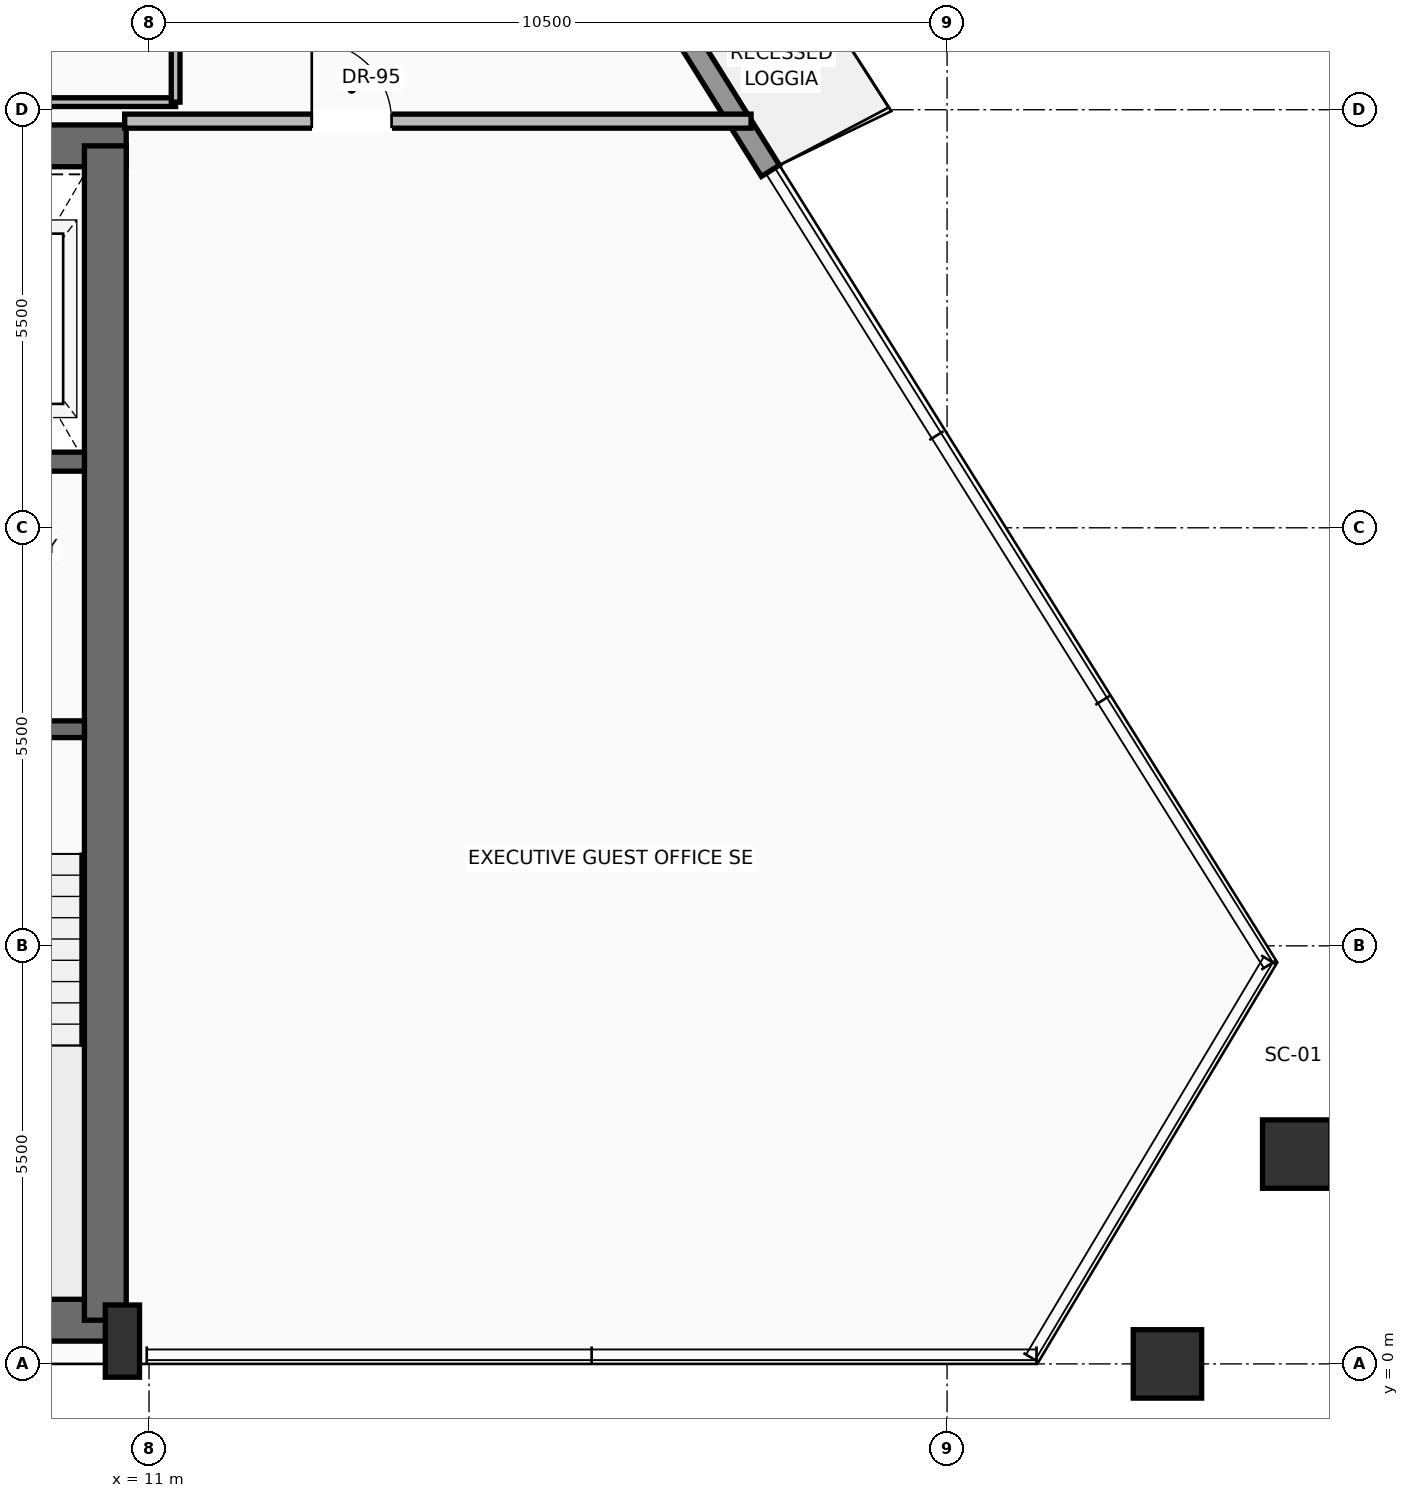
"""IFC4 building model, lengths in metres.
Left out: names, types, materials, properties, quantities, classifications, styles, units other than length and angle.
Written with IfcOpenShell. Run it as: python <this file> out.ifc"""

import sys

from ifc_helpers import new_model, si_unit, direction, frame, frame_2d, origin, origin_2d, place, context, subcontext, project, spatial, rectangle, hollow_rectangle, extrude, source, transform, mapped, element, fill, save


model = new_model("IFC4")
c1 = context("Model", 3, precision=1e-05, world=origin(), true_north=direction((0.0, 1.0)))
c2 = subcontext(c1, "Body", "Model", "MODEL_VIEW")
j1 = project(units=[si_unit("LENGTHUNIT", "METRE"), si_unit("PLANEANGLEUNIT", "RADIAN")], contexts=[c1])
p1 = place(None, origin())
s1 = spatial("IfcSite", under=j1, at=p1, CompositionType="ELEMENT")
p2 = place(p1, origin())
s2 = spatial("IfcBuilding", under=s1, at=p2, CompositionType="ELEMENT")
p3 = place(p2, frame((0.0, 0.0, 223.45)))
s3 = spatial("IfcBuildingStorey", under=s2, at=p3, CompositionType="ELEMENT", Elevation=223.45)
p4 = place(p3, frame((-10.65, 0.575, 0.0), z_axis=(0.0, 0.0, 1.0), x_axis=(1.0, 0.0, 0.0)))
e1 = element("IfcWall", 1, at=p4, inside=s3, PredefinedType="SHEAR", context=c2, shape_type="SweptSolid", body=[
    extrude(rectangle(XDim=21.3, YDim=0.55, at=frame_2d((10.65, 0.0))), origin(), (0.0, 0.0, 1.0), 3.24),
])
p5 = place(p3, frame((-10.7, 16.025, 0.0), z_axis=(0.0, 0.0, 1.0), x_axis=(1.0, 0.0, 0.0)))
e2 = element("IfcWall", 2, at=p5, inside=s3, PredefinedType="SHEAR", context=c2, shape_type="SweptSolid", body=[
    extrude(rectangle(XDim=21.4, YDim=0.55, at=frame_2d((10.7, 0.0))), origin(), (0.0, 0.0, 1.0), 3.24),
])
p6 = place(p5, frame((3.27, 0.0, 0.0)))
e3 = element("IfcOpeningElement", 3, at=p6, cuts=e2, PredefinedType="OPENING", context=c2, shape_type="SweptSolid", body=[
    extrude(rectangle(XDim=1.3, YDim=2.3, at=frame_2d((0.65, 1.15))), frame((0.0, 0.285, 0.0), z_axis=(0.0, -1.0, 0.0), x_axis=(1.0, 0.0, 0.0)), (0.0, 0.0, 1.0), 0.57),
])
p7 = place(p5, frame((9.7, 0.0, 0.0)))
e4 = element("IfcOpeningElement", 4, at=p7, cuts=e2, PredefinedType="OPENING", context=c2, shape_type="SweptSolid", body=[
    extrude(rectangle(XDim=2.0, YDim=2.4, at=frame_2d((1.0, 1.2))), frame((0.0, 0.285, 0.0), z_axis=(0.0, -1.0, 0.0), x_axis=(1.0, 0.0, 0.0)), (0.0, 0.0, 1.0), 0.57),
])
p8 = place(p3, frame((10.425, 0.575, 0.0), z_axis=(0.0, 0.0, 1.0), x_axis=(0.0, 1.0, 0.0)))
e5 = element("IfcWall", 5, at=p8, inside=s3, PredefinedType="SHEAR", context=c2, shape_type="SweptSolid", body=[
    extrude(rectangle(XDim=15.45, YDim=0.55, at=frame_2d((7.725, 0.0))), origin(), (0.0, 0.0, 1.0), 3.24),
])
m1 = source(origin(), c2, "Body", "SweptSolid", [
    extrude(rectangle(XDim=0.45, YDim=0.95, at=origin_2d()), origin(), (0.0, 0.0, 1.0), 3.45),
])
p9 = place(p3, frame((10.65, 0.3, 0.0), z_axis=(0.0, 0.0, 1.0), x_axis=(1.0, 0.0, 0.0)))
e6 = element("IfcColumn", 6, at=p9, inside=s3, PredefinedType="PILASTER", context=c2, shape_type="MappedRepresentation", body=[
    mapped(m1, transform((0.0, 0.0, 0.0), scale=1.0)),
])
m2 = source(origin(), c2, "Body", "SweptSolid", [
    extrude(hollow_rectangle(XDim=0.9, YDim=0.9, WallThickness=0.045, at=origin_2d()), origin(), (0.0, 0.0, 1.0), 3.441),
])
p10 = place(p3, frame((24.399, 0.0, 0.004), z_axis=(0.002766928039, 0.0, 0.999996172047), x_axis=(0.0, 1.0, 0.0)))
e7 = element("IfcColumn", 7, at=p10, inside=s3, PredefinedType="COLUMN", context=c2, shape_type="MappedRepresentation", body=[
    mapped(m2, transform((0.0, 0.0, 0.0), scale=1.0)),
])
m3 = source(origin(), c2, "Body", "SweptSolid", [
    extrude(hollow_rectangle(XDim=0.9, YDim=0.9, WallThickness=0.045, at=origin_2d()), origin(), (0.0, 0.0, 1.0), 3.442),
])
p11 = place(p3, frame((26.1, 2.76, 0.004), z_axis=(-0.008937740985, -0.016669596282, 0.999821104671), x_axis=(0.881312658049, -0.47253359538, 0.0)))
e8 = element("IfcColumn", 8, at=p11, inside=s3, PredefinedType="COLUMN", context=c2, shape_type="MappedRepresentation", body=[
    mapped(m3, transform((0.0, 0.0, 0.0), scale=1.0)),
])
p12 = place(p3, frame((8.883, 32.178, 0.0), z_axis=(0.0, 0.0, 1.0), x_axis=(0.529719957473, -0.848172604282, 0.0)))
e9 = element("IfcWall", 9, at=p12, inside=s3, PredefinedType="SOLIDWALL", context=c2, shape_type="SweptSolid", body=[
    extrude(rectangle(XDim=19.431, YDim=0.28, at=frame_2d((9.716, 0.0))), origin(), (0.0, 0.0, 1.0), 2.82),
])
p13 = place(p12, frame((4.664, 0.0, 0.0)))
e10 = element("IfcOpeningElement", 10, at=p13, cuts=e9, PredefinedType="OPENING", context=c2, shape_type="SweptSolid", body=[
    extrude(rectangle(XDim=1.6, YDim=2.35, at=frame_2d((0.8, 1.175))), frame((0.0, 0.15, 0.0), z_axis=(0.0, -1.0, 0.0), x_axis=(1.0, 0.0, 0.0)), (0.0, 0.0, 1.0), 0.3),
])
p14 = place(p12, frame((13.213, 0.0, 0.9)))
e11 = element("IfcOpeningElement", 11, at=p14, cuts=e9, PredefinedType="OPENING", context=c2, shape_type="SweptSolid", body=[
    extrude(rectangle(XDim=1.55, YDim=1.75, at=frame_2d((0.775, 0.875))), frame((0.0, 0.15, 0.0), z_axis=(0.0, -1.0, 0.0), x_axis=(1.0, 0.0, 0.0)), (0.0, 0.0, 1.0), 0.3),
])
p15 = place(p3, frame((10.15, 8.35, 0.0), z_axis=(0.0, 0.0, 1.0), x_axis=(-1.0, 0.0, 0.0)))
e12 = element("IfcWall", 12, at=p15, inside=s3, PredefinedType="SOLIDWALL", context=c2, shape_type="SweptSolid", body=[
    extrude(rectangle(XDim=4.65, YDim=0.22, at=frame_2d((2.325, 0.0))), origin(), (0.0, 0.0, 1.0), 3.24),
])
p16 = place(p15, frame((1.0, 0.0, 0.0)))
e13 = element("IfcOpeningElement", 13, at=p16, cuts=e12, PredefinedType="OPENING", context=c2, shape_type="SweptSolid", body=[
    extrude(rectangle(XDim=1.15, YDim=2.2, at=frame_2d((0.575, 1.1))), frame((0.0, 0.12, 0.0), z_axis=(0.0, -1.0, 0.0), x_axis=(1.0, 0.0, 0.0)), (0.0, 0.0, 1.0), 0.24),
])
p17 = place(p3, frame((10.15, 11.87, 0.0), z_axis=(0.0, 0.0, 1.0), x_axis=(-1.0, 0.0, 0.0)))
e14 = element("IfcWall", 14, at=p17, inside=s3, PredefinedType="SOLIDWALL", context=c2, shape_type="SweptSolid", body=[
    extrude(rectangle(XDim=4.65, YDim=0.25, at=frame_2d((2.325, 0.0))), origin(), (0.0, 0.0, 1.0), 3.24),
])
p18 = place(p17, frame((0.5, 0.0, 0.0)))
e15 = element("IfcOpeningElement", 15, at=p18, cuts=e14, PredefinedType="OPENING", context=c2, shape_type="SweptSolid", body=[
    extrude(rectangle(XDim=1.2, YDim=2.25, at=frame_2d((0.6, 1.125))), frame((0.0, 0.135, 0.0), z_axis=(0.0, -1.0, 0.0), x_axis=(1.0, 0.0, 0.0)), (0.0, 0.0, 1.0), 0.27),
])
p19 = place(p3, frame((10.68, 16.35, 0.0), z_axis=(0.0, 0.0, 1.0), x_axis=(1.0, 0.0, 0.0)))
e16 = element("IfcWall", 16, at=p19, inside=s3, PredefinedType="PARTITIONING", context=c2, shape_type="SweptSolid", body=[
    extrude(rectangle(XDim=8.241, YDim=0.185, at=frame_2d((4.121, 0.0))), origin(), (0.0, 0.0, 1.0), 3.232),
])
p20 = place(p19, frame((2.461, 0.0, 0.0)))
e17 = element("IfcOpeningElement", 17, at=p20, cuts=e16, PredefinedType="OPENING", context=c2, shape_type="SweptSolid", body=[
    extrude(rectangle(XDim=1.05, YDim=2.25, at=frame_2d((0.525, 1.125))), frame((0.0, 0.103, 0.0), z_axis=(0.0, -1.0, 0.0), x_axis=(1.0, 0.0, 0.0)), (0.0, 0.0, 1.0), 0.205),
])
p21 = place(p3, frame((8.7, 16.6, 0.0), z_axis=(0.0, 0.0, 1.0), x_axis=(1.0, 0.0, 0.0)))
e18 = element("IfcWall", 18, at=p21, inside=s3, PredefinedType="PARTITIONING", context=c2, shape_type="SweptSolid", body=[
    extrude(rectangle(XDim=2.65, YDim=0.115, at=frame_2d((1.325, 0.0))), origin(), (0.0, 0.0, 1.0), 3.232),
])
p22 = place(p3, frame((11.35, 16.6, 0.0), z_axis=(0.0, 0.0, 1.0), x_axis=(0.0, 1.0, 0.0)))
e19 = element("IfcWall", 19, at=p22, inside=s3, PredefinedType="PARTITIONING", context=c2, shape_type="SweptSolid", body=[
    extrude(rectangle(XDim=2.4, YDim=0.115, at=frame_2d((1.2, 0.0))), origin(), (0.0, 0.0, 1.0), 3.232),
])
p23 = place(p22, frame((0.75, 0.0, 0.0)))
e20 = element("IfcOpeningElement", 20, at=p23, cuts=e19, PredefinedType="OPENING", context=c2, shape_type="SweptSolid", body=[
    extrude(rectangle(XDim=0.9, YDim=2.15, at=frame_2d((0.45, 1.075))), frame((0.0, 0.067, 0.0), z_axis=(0.0, -1.0, 0.0), x_axis=(1.0, 0.0, 0.0)), (0.0, 0.0, 1.0), 0.135),
])
m4 = source(origin(), c2, "Body", "SweptSolid", [
    extrude(rectangle(XDim=1.05, YDim=2.25, at=frame_2d((0.525, 1.125))), frame((0.0, 0.025, 0.0), z_axis=(0.0, -1.0, 0.0), x_axis=(1.0, 0.0, 0.0)), (0.0, 0.0, 1.0), 0.05),
])
p24 = place(p20, origin())
e21 = element("IfcDoor", 21, at=p24, inside=s3, OperationType="SINGLE_SWING_LEFT", PredefinedType="DOOR", context=c2, shape_type="MappedRepresentation", body=[
    mapped(m4, transform((0.0, 0.0, 0.0), scale=1.0)),
])
fill(e17, e21)
save(model, sys.argv[1])
